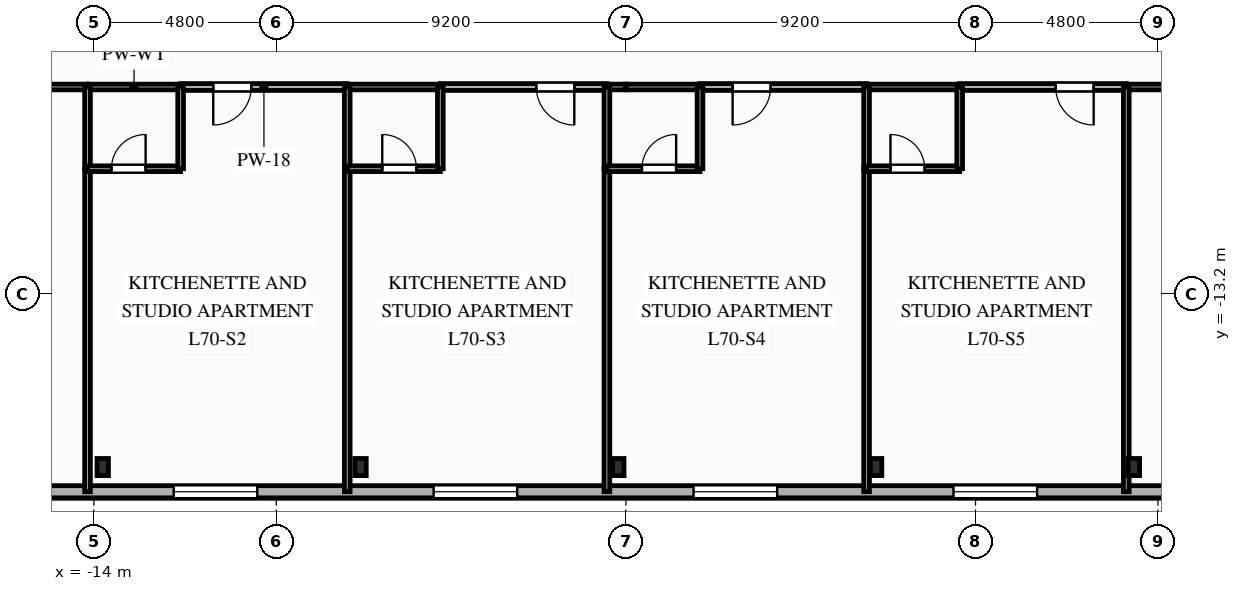
"""IFC4 building model, lengths in metres.
Left out: names, types, materials, properties, quantities, classifications, styles, units other than length and angle.
Written with IfcOpenShell. Run it as: python <this file> out.ifc"""

import sys

from ifc_helpers import new_model, si_unit, direction, frame, frame_2d, origin, origin_2d, place, context, subcontext, project, spatial, rectangle, i_section, extrude, element, fill, save


model = new_model("IFC4")
c1 = context("Model", 3, precision=1e-05, world=origin(), true_north=direction((0.0, 1.0)))
c2 = subcontext(c1, "Body", "Model", "MODEL_VIEW")
j1 = project(units=[si_unit("LENGTHUNIT", "METRE"), si_unit("PLANEANGLEUNIT", "RADIAN")], contexts=[c1])
p1 = place(None, origin())
s1 = spatial("IfcSite", under=j1, at=p1, CompositionType="ELEMENT")
p2 = place(p1, origin())
s2 = spatial("IfcBuilding", under=s1, at=p2, CompositionType="ELEMENT")
p3 = place(p2, frame((0.0, 0.0, 248.4)))
s3 = spatial("IfcBuildingStorey", under=s2, at=p3, CompositionType="ELEMENT", Elevation=248.4)
for number, where, z_axis, x_axis in (
    (1, (-13.767, -17.75, 0.0), (0.0, 0.0, 1.0), (1.0, 0.0, 0.0)),
    (2, (-6.983, -17.75, 0.0), (0.0, 0.0, 1.0), (1.0, 0.0, 0.0)),
    (3, (-0.2, -17.75, 0.0), (0.0, 0.0, 1.0), (1.0, 0.0, 0.0)),
    (4, (6.583, -17.75, 0.0), (0.0, 0.0, 1.0), (1.0, 0.0, 0.0)),
    (5, (13.367, -17.75, 0.0), (0.0, 0.0, 1.0), (1.0, 0.0, 0.0)),
):
    element("IfcColumn", number, at=place(p3, frame(where, z_axis=z_axis, x_axis=x_axis)), inside=s3, PredefinedType="COLUMN", context=c2, shape_type="SweptSolid", body=[
        extrude(i_section(OverallWidth=0.3, OverallDepth=0.45, WebThickness=0.014, FlangeThickness=0.026, FilletRadius=0.027, at=origin_2d()), origin(), (0.0, 0.0, 1.0), 3.35),
    ])
p4 = place(p3, frame((20.8, -18.4, 0.0), z_axis=(0.0, 0.0, 1.0), x_axis=(-1.0, 0.0, 0.0)))
e6 = element("IfcWall", 6, at=p4, inside=s3, PredefinedType="SOLIDWALL", context=c2, shape_type="SweptSolid", body=[
    extrude(rectangle(XDim=42.0, YDim=0.32, at=frame_2d((21.0, 0.0))), origin(), (0.0, 0.0, 1.0), 3.04),
])
p5 = place(p4, frame((3.255, 0.0, 0.85)))
e7 = element("IfcOpeningElement", 7, at=p5, cuts=e6, PredefinedType="OPENING", context=c2, shape_type="SweptSolid", body=[
    extrude(rectangle(XDim=1.65, YDim=1.85, at=frame_2d((0.825, 0.925))), frame((0.0, 0.17, 0.0), z_axis=(0.0, -1.0, 0.0), x_axis=(1.0, 0.0, 0.0)), (0.0, 0.0, 1.0), 0.34),
])
p6 = place(p4, frame((9.98, 0.0, 0.85)))
e8 = element("IfcOpeningElement", 8, at=p6, cuts=e6, PredefinedType="OPENING", context=c2, shape_type="SweptSolid", body=[
    extrude(rectangle(XDim=2.2, YDim=1.85, at=frame_2d((1.1, 0.925))), frame((0.0, 0.17, 0.0), z_axis=(0.0, -1.0, 0.0), x_axis=(1.0, 0.0, 0.0)), (0.0, 0.0, 1.0), 0.34),
])
p7 = place(p4, frame((16.82, 0.0, 0.85)))
e9 = element("IfcOpeningElement", 9, at=p7, cuts=e6, PredefinedType="OPENING", context=c2, shape_type="SweptSolid", body=[
    extrude(rectangle(XDim=2.2, YDim=1.85, at=frame_2d((1.1, 0.925))), frame((0.0, 0.17, 0.0), z_axis=(0.0, -1.0, 0.0), x_axis=(1.0, 0.0, 0.0)), (0.0, 0.0, 1.0), 0.34),
])
p8 = place(p4, frame((23.66, 0.0, 0.85)))
e10 = element("IfcOpeningElement", 10, at=p8, cuts=e6, PredefinedType="OPENING", context=c2, shape_type="SweptSolid", body=[
    extrude(rectangle(XDim=2.2, YDim=1.85, at=frame_2d((1.1, 0.925))), frame((0.0, 0.17, 0.0), z_axis=(0.0, -1.0, 0.0), x_axis=(1.0, 0.0, 0.0)), (0.0, 0.0, 1.0), 0.34),
])
p9 = place(p4, frame((30.5, 0.0, 0.85)))
e11 = element("IfcOpeningElement", 11, at=p9, cuts=e6, PredefinedType="OPENING", context=c2, shape_type="SweptSolid", body=[
    extrude(rectangle(XDim=2.2, YDim=1.85, at=frame_2d((1.1, 0.925))), frame((0.0, 0.17, 0.0), z_axis=(0.0, -1.0, 0.0), x_axis=(1.0, 0.0, 0.0)), (0.0, 0.0, 1.0), 0.34),
])
p10 = place(p4, frame((37.375, 0.0, 0.85)))
e12 = element("IfcOpeningElement", 12, at=p10, cuts=e6, PredefinedType="OPENING", context=c2, shape_type="SweptSolid", body=[
    extrude(rectangle(XDim=1.65, YDim=1.85, at=frame_2d((0.825, 0.925))), frame((0.0, 0.17, 0.0), z_axis=(0.0, -1.0, 0.0), x_axis=(1.0, 0.0, 0.0)), (0.0, 0.0, 1.0), 0.34),
])
p11 = place(p3, frame((-14.167, -7.75, 0.0), z_axis=(0.0, 0.0, 1.0), x_axis=(-1.0, 0.0, 0.0)))
e13 = element("IfcWall", 13, at=p11, inside=s3, PredefinedType="PARTITIONING", context=c2, shape_type="SweptSolid", body=[
    extrude(rectangle(XDim=6.333, YDim=0.15, at=frame_2d((3.167, 0.0))), origin(), (0.0, 0.0, 1.0), 3.04),
])
p12 = place(p11, frame((1.095, 0.0, 0.0)))
e14 = element("IfcOpeningElement", 14, at=p12, cuts=e13, PredefinedType="OPENING", context=c2, shape_type="SweptSolid", body=[
    extrude(rectangle(XDim=1.05, YDim=2.15, at=frame_2d((0.525, 1.075))), frame((0.0, 0.085, 0.0), z_axis=(0.0, -1.0, 0.0), x_axis=(1.0, 0.0, 0.0)), (0.0, 0.0, 1.0), 0.17),
])
p13 = place(p3, frame((-7.333, -7.75, 0.0), z_axis=(0.0, 0.0, 1.0), x_axis=(-1.0, 0.0, 0.0)))
e15 = element("IfcWall", 15, at=p13, inside=s3, PredefinedType="PARTITIONING", context=c2, shape_type="SweptSolid", body=[
    extrude(rectangle(XDim=4.384, YDim=0.18, at=frame_2d((2.192, 0.0))), origin(), (0.0, 0.0, 1.0), 3.04),
])
p14 = place(p13, frame((2.526, 0.0, 0.0)))
e16 = element("IfcOpeningElement", 16, at=p14, cuts=e15, PredefinedType="OPENING", context=c2, shape_type="SweptSolid", body=[
    extrude(rectangle(XDim=1.0, YDim=2.15, at=frame_2d((0.5, 1.075))), frame((0.0, 0.1, 0.0), z_axis=(0.0, -1.0, 0.0), x_axis=(1.0, 0.0, 0.0)), (0.0, 0.0, 1.0), 0.2),
])
p15 = place(p3, frame((-11.717, -7.75, 0.0), z_axis=(0.0, 0.0, 1.0), x_axis=(-1.0, 0.0, 0.0)))
e17 = element("IfcWall", 17, at=p15, inside=s3, PredefinedType="PLUMBINGWALL", context=c2, shape_type="SweptSolid", body=[
    extrude(rectangle(XDim=2.45, YDim=0.15, at=frame_2d((1.225, 0.0))), origin(), (0.0, 0.0, 1.0), 3.04),
])
p16 = place(p3, frame((-0.5, -7.75, 0.0), z_axis=(0.0, 0.0, 1.0), x_axis=(-1.0, 0.0, 0.0)))
e18 = element("IfcWall", 18, at=p16, inside=s3, PredefinedType="PARTITIONING", context=c2, shape_type="SweptSolid", body=[
    extrude(rectangle(XDim=4.383, YDim=0.18, at=frame_2d((2.191, 0.0))), origin(), (0.0, 0.0, 1.0), 3.04),
])
p17 = place(p16, frame((0.858, 0.0, 0.0)))
e19 = element("IfcOpeningElement", 19, at=p17, cuts=e18, PredefinedType="OPENING", context=c2, shape_type="SweptSolid", body=[
    extrude(rectangle(XDim=1.0, YDim=2.15, at=frame_2d((0.5, 1.075))), frame((0.0, 0.1, 0.0), z_axis=(0.0, -1.0, 0.0), x_axis=(1.0, 0.0, 0.0)), (0.0, 0.0, 1.0), 0.2),
])
p18 = place(p3, frame((-4.883, -7.75, 0.0), z_axis=(0.0, 0.0, 1.0), x_axis=(-1.0, 0.0, 0.0)))
e20 = element("IfcWall", 20, at=p18, inside=s3, PredefinedType="PLUMBINGWALL", context=c2, shape_type="SweptSolid", body=[
    extrude(rectangle(XDim=2.45, YDim=0.15, at=frame_2d((1.225, 0.0))), origin(), (0.0, 0.0, 1.0), 3.04),
])
p19 = place(p3, frame((0.0, -7.75, 0.0), z_axis=(0.0, 0.0, 1.0), x_axis=(-1.0, 0.0, 0.0)))
e21 = element("IfcWall", 21, at=p19, inside=s3, PredefinedType="PLUMBINGWALL", context=c2, shape_type="SweptSolid", body=[
    extrude(rectangle(XDim=0.5, YDim=0.15, at=frame_2d((0.25, 0.0))), origin(), (0.0, 0.0, 1.0), 3.04),
])
p20 = place(p3, frame((6.333, -7.75, 0.0), z_axis=(0.0, 0.0, 1.0), x_axis=(-1.0, 0.0, 0.0)))
e22 = element("IfcWall", 22, at=p20, inside=s3, PredefinedType="PARTITIONING", context=c2, shape_type="SweptSolid", body=[
    extrude(rectangle(XDim=4.383, YDim=0.18, at=frame_2d((2.191, 0.0))), origin(), (0.0, 0.0, 1.0), 3.04),
])
p21 = place(p20, frame((2.525, 0.0, 0.0)))
e23 = element("IfcOpeningElement", 23, at=p21, cuts=e22, PredefinedType="OPENING", context=c2, shape_type="SweptSolid", body=[
    extrude(rectangle(XDim=1.0, YDim=2.15, at=frame_2d((0.5, 1.075))), frame((0.0, 0.1, 0.0), z_axis=(0.0, -1.0, 0.0), x_axis=(1.0, 0.0, 0.0)), (0.0, 0.0, 1.0), 0.2),
])
p22 = place(p3, frame((1.95, -7.75, 0.0), z_axis=(0.0, 0.0, 1.0), x_axis=(-1.0, 0.0, 0.0)))
e24 = element("IfcWall", 24, at=p22, inside=s3, PredefinedType="PLUMBINGWALL", context=c2, shape_type="SweptSolid", body=[
    extrude(rectangle(XDim=1.95, YDim=0.15, at=frame_2d((0.975, 0.0))), origin(), (0.0, 0.0, 1.0), 3.04),
])
p23 = place(p3, frame((13.167, -7.75, 0.0), z_axis=(0.0, 0.0, 1.0), x_axis=(-1.0, 0.0, 0.0)))
e25 = element("IfcWall", 25, at=p23, inside=s3, PredefinedType="PARTITIONING", context=c2, shape_type="SweptSolid", body=[
    extrude(rectangle(XDim=4.384, YDim=0.18, at=frame_2d((2.192, 0.0))), origin(), (0.0, 0.0, 1.0), 3.04),
])
p24 = place(p23, frame((0.858, 0.0, 0.0)))
e26 = element("IfcOpeningElement", 26, at=p24, cuts=e25, PredefinedType="OPENING", context=c2, shape_type="SweptSolid", body=[
    extrude(rectangle(XDim=1.0, YDim=2.15, at=frame_2d((0.5, 1.075))), frame((0.0, 0.1, 0.0), z_axis=(0.0, -1.0, 0.0), x_axis=(1.0, 0.0, 0.0)), (0.0, 0.0, 1.0), 0.2),
])
p25 = place(p3, frame((8.783, -7.75, 0.0), z_axis=(0.0, 0.0, 1.0), x_axis=(-1.0, 0.0, 0.0)))
e27 = element("IfcWall", 27, at=p25, inside=s3, PredefinedType="PLUMBINGWALL", context=c2, shape_type="SweptSolid", body=[
    extrude(rectangle(XDim=2.45, YDim=0.15, at=frame_2d((1.225, 0.0))), origin(), (0.0, 0.0, 1.0), 3.04),
])
p26 = place(p3, frame((20.5, -7.75, 0.0), z_axis=(0.0, 0.0, 1.0), x_axis=(-1.0, 0.0, 0.0)))
e28 = element("IfcWall", 28, at=p26, inside=s3, PredefinedType="PARTITIONING", context=c2, shape_type="SweptSolid", body=[
    extrude(rectangle(XDim=7.333, YDim=0.15, at=frame_2d((3.667, 0.0))), origin(), (0.0, 0.0, 1.0), 3.04),
])
p27 = place(p26, frame((5.062, 0.0, 0.0)))
e29 = element("IfcOpeningElement", 29, at=p27, cuts=e28, PredefinedType="OPENING", context=c2, shape_type="SweptSolid", body=[
    extrude(rectangle(XDim=1.05, YDim=2.15, at=frame_2d((0.525, 1.075))), frame((0.0, 0.085, 0.0), z_axis=(0.0, -1.0, 0.0), x_axis=(1.0, 0.0, 0.0)), (0.0, 0.0, 1.0), 0.17),
])
p28 = place(p3, frame((-14.167, -9.9, 0.0), z_axis=(0.0, 0.0, 1.0), x_axis=(0.0, -1.0, 0.0)))
e30 = element("IfcWall", 30, at=p28, inside=s3, PredefinedType="PARTITIONING", context=c2, shape_type="SweptSolid", body=[
    extrude(rectangle(XDim=8.5, YDim=0.15, at=frame_2d((4.25, 0.0))), origin(), (0.0, 0.0, 1.0), 3.04),
])
p29 = place(p3, frame((-14.167, -7.75, 0.0), z_axis=(0.0, 0.0, 1.0), x_axis=(0.0, -1.0, 0.0)))
e31 = element("IfcWall", 31, at=p29, inside=s3, PredefinedType="PLUMBINGWALL", context=c2, shape_type="SweptSolid", body=[
    extrude(rectangle(XDim=2.15, YDim=0.15, at=frame_2d((1.075, 0.0))), origin(), (0.0, 0.0, 1.0), 3.04),
])
p30 = place(p3, frame((-14.167, -9.9, 0.0), z_axis=(0.0, 0.0, 1.0), x_axis=(1.0, 0.0, 0.0)))
e32 = element("IfcWall", 32, at=p30, inside=s3, PredefinedType="PLUMBINGWALL", context=c2, shape_type="SweptSolid", body=[
    extrude(rectangle(XDim=2.45, YDim=0.15, at=frame_2d((1.225, 0.0))), origin(), (0.0, 0.0, 1.0), 3.04),
])
p31 = place(p30, frame((0.629, 0.0, 0.0)))
e33 = element("IfcOpeningElement", 33, at=p31, cuts=e32, PredefinedType="OPENING", context=c2, shape_type="SweptSolid", body=[
    extrude(rectangle(XDim=0.9, YDim=2.1, at=frame_2d((0.45, 1.05))), frame((0.0, 0.085, 0.0), z_axis=(0.0, -1.0, 0.0), x_axis=(1.0, 0.0, 0.0)), (0.0, 0.0, 1.0), 0.17),
])
p32 = place(p3, frame((-11.717, -9.9, 0.0), z_axis=(0.0, 0.0, 1.0), x_axis=(0.0, 1.0, 0.0)))
e34 = element("IfcWall", 34, at=p32, inside=s3, PredefinedType="PLUMBINGWALL", context=c2, shape_type="SweptSolid", body=[
    extrude(rectangle(XDim=2.15, YDim=0.15, at=frame_2d((1.075, 0.0))), origin(), (0.0, 0.0, 1.0), 3.04),
])
p33 = place(p3, frame((-7.333, -9.9, 0.0), z_axis=(0.0, 0.0, 1.0), x_axis=(0.0, -1.0, 0.0)))
e35 = element("IfcWall", 35, at=p33, inside=s3, PredefinedType="PARTITIONING", context=c2, shape_type="SweptSolid", body=[
    extrude(rectangle(XDim=8.5, YDim=0.15, at=frame_2d((4.25, 0.0))), origin(), (0.0, 0.0, 1.0), 2.665),
])
p34 = place(p3, frame((-7.333, -7.75, 0.0), z_axis=(0.0, 0.0, 1.0), x_axis=(0.0, -1.0, 0.0)))
e36 = element("IfcWall", 36, at=p34, inside=s3, PredefinedType="PLUMBINGWALL", context=c2, shape_type="SweptSolid", body=[
    extrude(rectangle(XDim=2.15, YDim=0.15, at=frame_2d((1.075, 0.0))), origin(), (0.0, 0.0, 1.0), 3.04),
])
p35 = place(p3, frame((-7.333, -9.9, 0.0), z_axis=(0.0, 0.0, 1.0), x_axis=(1.0, 0.0, 0.0)))
e37 = element("IfcWall", 37, at=p35, inside=s3, PredefinedType="PLUMBINGWALL", context=c2, shape_type="SweptSolid", body=[
    extrude(rectangle(XDim=2.45, YDim=0.15, at=frame_2d((1.225, 0.0))), origin(), (0.0, 0.0, 1.0), 3.04),
])
p36 = place(p35, frame((0.921, 0.0, 0.0)))
e38 = element("IfcOpeningElement", 38, at=p36, cuts=e37, PredefinedType="OPENING", context=c2, shape_type="SweptSolid", body=[
    extrude(rectangle(XDim=0.9, YDim=2.1, at=frame_2d((0.45, 1.05))), frame((0.0, 0.085, 0.0), z_axis=(0.0, -1.0, 0.0), x_axis=(1.0, 0.0, 0.0)), (0.0, 0.0, 1.0), 0.17),
])
p37 = place(p3, frame((-4.883, -9.9, 0.0), z_axis=(0.0, 0.0, 1.0), x_axis=(0.0, 1.0, 0.0)))
e39 = element("IfcWall", 39, at=p37, inside=s3, PredefinedType="PLUMBINGWALL", context=c2, shape_type="SweptSolid", body=[
    extrude(rectangle(XDim=2.15, YDim=0.15, at=frame_2d((1.075, 0.0))), origin(), (0.0, 0.0, 1.0), 3.04),
])
p38 = place(p3, frame((-0.5, -9.9, 0.0), z_axis=(0.0, 0.0, 1.0), x_axis=(0.0, -1.0, 0.0)))
e40 = element("IfcWall", 40, at=p38, inside=s3, PredefinedType="PARTITIONING", context=c2, shape_type="SweptSolid", body=[
    extrude(rectangle(XDim=8.5, YDim=0.15, at=frame_2d((4.25, 0.0))), origin(), (0.0, 0.0, 1.0), 3.04),
])
p39 = place(p3, frame((-0.5, -7.75, 0.0), z_axis=(0.0, 0.0, 1.0), x_axis=(0.0, -1.0, 0.0)))
e41 = element("IfcWall", 41, at=p39, inside=s3, PredefinedType="PLUMBINGWALL", context=c2, shape_type="SweptSolid", body=[
    extrude(rectangle(XDim=2.15, YDim=0.15, at=frame_2d((1.075, 0.0))), origin(), (0.0, 0.0, 1.0), 3.04),
])
p40 = place(p3, frame((-0.5, -9.9, 0.0), z_axis=(0.0, 0.0, 1.0), x_axis=(1.0, 0.0, 0.0)))
e42 = element("IfcWall", 42, at=p40, inside=s3, PredefinedType="PLUMBINGWALL", context=c2, shape_type="SweptSolid", body=[
    extrude(rectangle(XDim=2.45, YDim=0.15, at=frame_2d((1.225, 0.0))), origin(), (0.0, 0.0, 1.0), 3.04),
])
p41 = place(p40, frame((0.921, 0.0, 0.0)))
e43 = element("IfcOpeningElement", 43, at=p41, cuts=e42, PredefinedType="OPENING", context=c2, shape_type="SweptSolid", body=[
    extrude(rectangle(XDim=0.9, YDim=2.1, at=frame_2d((0.45, 1.05))), frame((0.0, 0.085, 0.0), z_axis=(0.0, -1.0, 0.0), x_axis=(1.0, 0.0, 0.0)), (0.0, 0.0, 1.0), 0.17),
])
p42 = place(p3, frame((1.95, -9.9, 0.0), z_axis=(0.0, 0.0, 1.0), x_axis=(0.0, 1.0, 0.0)))
e44 = element("IfcWall", 44, at=p42, inside=s3, PredefinedType="PLUMBINGWALL", context=c2, shape_type="SweptSolid", body=[
    extrude(rectangle(XDim=2.15, YDim=0.15, at=frame_2d((1.075, 0.0))), origin(), (0.0, 0.0, 1.0), 3.04),
])
p43 = place(p3, frame((6.333, -9.9, 0.0), z_axis=(0.0, 0.0, 1.0), x_axis=(0.0, -1.0, 0.0)))
e45 = element("IfcWall", 45, at=p43, inside=s3, PredefinedType="PARTITIONING", context=c2, shape_type="SweptSolid", body=[
    extrude(rectangle(XDim=8.5, YDim=0.15, at=frame_2d((4.25, 0.0))), origin(), (0.0, 0.0, 1.0), 3.04),
])
p44 = place(p3, frame((6.333, -7.75, 0.0), z_axis=(0.0, 0.0, 1.0), x_axis=(0.0, -1.0, 0.0)))
e46 = element("IfcWall", 46, at=p44, inside=s3, PredefinedType="PLUMBINGWALL", context=c2, shape_type="SweptSolid", body=[
    extrude(rectangle(XDim=2.15, YDim=0.15, at=frame_2d((1.075, 0.0))), origin(), (0.0, 0.0, 1.0), 3.04),
])
p45 = place(p3, frame((6.333, -9.9, 0.0), z_axis=(0.0, 0.0, 1.0), x_axis=(1.0, 0.0, 0.0)))
e47 = element("IfcWall", 47, at=p45, inside=s3, PredefinedType="PLUMBINGWALL", context=c2, shape_type="SweptSolid", body=[
    extrude(rectangle(XDim=2.45, YDim=0.15, at=frame_2d((1.225, 0.0))), origin(), (0.0, 0.0, 1.0), 3.04),
])
p46 = place(p45, frame((0.629, 0.0, 0.0)))
e48 = element("IfcOpeningElement", 48, at=p46, cuts=e47, PredefinedType="OPENING", context=c2, shape_type="SweptSolid", body=[
    extrude(rectangle(XDim=0.9, YDim=2.1, at=frame_2d((0.45, 1.05))), frame((0.0, 0.085, 0.0), z_axis=(0.0, -1.0, 0.0), x_axis=(1.0, 0.0, 0.0)), (0.0, 0.0, 1.0), 0.17),
])
p47 = place(p3, frame((8.783, -9.9, 0.0), z_axis=(0.0, 0.0, 1.0), x_axis=(0.0, 1.0, 0.0)))
e49 = element("IfcWall", 49, at=p47, inside=s3, PredefinedType="PLUMBINGWALL", context=c2, shape_type="SweptSolid", body=[
    extrude(rectangle(XDim=2.15, YDim=0.15, at=frame_2d((1.075, 0.0))), origin(), (0.0, 0.0, 1.0), 2.665),
])
p48 = place(p3, frame((13.167, -7.75, 0.0), z_axis=(0.0, 0.0, 1.0), x_axis=(0.0, -1.0, 0.0)))
e50 = element("IfcWall", 50, at=p48, inside=s3, PredefinedType="PARTITIONING", context=c2, shape_type="SweptSolid", body=[
    extrude(rectangle(XDim=10.65, YDim=0.15, at=frame_2d((5.325, 0.0))), origin(), (0.0, 0.0, 1.0), 3.04),
])
p49 = place(p6, origin())
e51 = element("IfcWindow", 51, at=p49, inside=s3, PartitioningType="SINGLE_PANEL", PredefinedType="WINDOW", context=c2, shape_type="SweptSolid", body=[
    extrude(rectangle(XDim=2.2, YDim=1.85, at=frame_2d((1.1, 0.925))), frame((0.0, 0.03, 0.0), z_axis=(0.0, -1.0, 0.0), x_axis=(1.0, 0.0, 0.0)), (0.0, 0.0, 1.0), 0.06),
])
fill(e8, e51)
p50 = place(p7, origin())
e52 = element("IfcWindow", 52, at=p50, inside=s3, PartitioningType="SINGLE_PANEL", PredefinedType="WINDOW", context=c2, shape_type="SweptSolid", body=[
    extrude(rectangle(XDim=2.2, YDim=1.85, at=frame_2d((1.1, 0.925))), frame((0.0, 0.03, 0.0), z_axis=(0.0, -1.0, 0.0), x_axis=(1.0, 0.0, 0.0)), (0.0, 0.0, 1.0), 0.06),
])
fill(e9, e52)
p51 = place(p8, origin())
e53 = element("IfcWindow", 53, at=p51, inside=s3, PartitioningType="SINGLE_PANEL", PredefinedType="WINDOW", context=c2, shape_type="SweptSolid", body=[
    extrude(rectangle(XDim=2.2, YDim=1.85, at=frame_2d((1.1, 0.925))), frame((0.0, 0.03, 0.0), z_axis=(0.0, -1.0, 0.0), x_axis=(1.0, 0.0, 0.0)), (0.0, 0.0, 1.0), 0.06),
])
fill(e10, e53)
p52 = place(p9, origin())
e54 = element("IfcWindow", 54, at=p52, inside=s3, PartitioningType="SINGLE_PANEL", PredefinedType="WINDOW", context=c2, shape_type="SweptSolid", body=[
    extrude(rectangle(XDim=2.2, YDim=1.85, at=frame_2d((1.1, 0.925))), frame((0.0, 0.03, 0.0), z_axis=(0.0, -1.0, 0.0), x_axis=(1.0, 0.0, 0.0)), (0.0, 0.0, 1.0), 0.06),
])
fill(e11, e54)
p53 = place(p14, origin())
e55 = element("IfcDoor", 55, at=p53, inside=s3, OperationType="SINGLE_SWING_RIGHT", PredefinedType="DOOR", context=c2, shape_type="SweptSolid", body=[
    extrude(rectangle(XDim=1.0, YDim=2.15, at=frame_2d((0.5, 1.075))), frame((0.0, 0.025, 0.0), z_axis=(0.0, -1.0, 0.0), x_axis=(1.0, 0.0, 0.0)), (0.0, 0.0, 1.0), 0.05),
])
fill(e16, e55)
p54 = place(p17, origin())
e56 = element("IfcDoor", 56, at=p54, inside=s3, OperationType="SINGLE_SWING_LEFT", PredefinedType="DOOR", context=c2, shape_type="SweptSolid", body=[
    extrude(rectangle(XDim=1.0, YDim=2.15, at=frame_2d((0.5, 1.075))), frame((0.0, 0.025, 0.0), z_axis=(0.0, -1.0, 0.0), x_axis=(1.0, 0.0, 0.0)), (0.0, 0.0, 1.0), 0.05),
])
fill(e19, e56)
p55 = place(p21, origin())
e57 = element("IfcDoor", 57, at=p55, inside=s3, OperationType="SINGLE_SWING_RIGHT", PredefinedType="DOOR", context=c2, shape_type="SweptSolid", body=[
    extrude(rectangle(XDim=1.0, YDim=2.15, at=frame_2d((0.5, 1.075))), frame((0.0, 0.025, 0.0), z_axis=(0.0, -1.0, 0.0), x_axis=(1.0, 0.0, 0.0)), (0.0, 0.0, 1.0), 0.05),
])
fill(e23, e57)
p56 = place(p24, origin())
e58 = element("IfcDoor", 58, at=p56, inside=s3, OperationType="SINGLE_SWING_LEFT", PredefinedType="DOOR", context=c2, shape_type="SweptSolid", body=[
    extrude(rectangle(XDim=1.0, YDim=2.15, at=frame_2d((0.5, 1.075))), frame((0.0, 0.025, 0.0), z_axis=(0.0, -1.0, 0.0), x_axis=(1.0, 0.0, 0.0)), (0.0, 0.0, 1.0), 0.05),
])
fill(e26, e58)
p57 = place(p31, origin())
e59 = element("IfcDoor", 59, at=p57, inside=s3, OperationType="SINGLE_SWING_RIGHT", PredefinedType="DOOR", context=c2, shape_type="SweptSolid", body=[
    extrude(rectangle(XDim=0.9, YDim=2.1, at=frame_2d((0.45, 1.05))), frame((0.0, 0.025, 0.0), z_axis=(0.0, -1.0, 0.0), x_axis=(1.0, 0.0, 0.0)), (0.0, 0.0, 1.0), 0.05),
])
fill(e33, e59)
p58 = place(p36, origin())
e60 = element("IfcDoor", 60, at=p58, inside=s3, OperationType="SINGLE_SWING_LEFT", PredefinedType="DOOR", context=c2, shape_type="SweptSolid", body=[
    extrude(rectangle(XDim=0.9, YDim=2.1, at=frame_2d((0.45, 1.05))), frame((0.0, 0.025, 0.0), z_axis=(0.0, -1.0, 0.0), x_axis=(1.0, 0.0, 0.0)), (0.0, 0.0, 1.0), 0.05),
])
fill(e38, e60)
p59 = place(p41, origin())
e61 = element("IfcDoor", 61, at=p59, inside=s3, OperationType="SINGLE_SWING_RIGHT", PredefinedType="DOOR", context=c2, shape_type="SweptSolid", body=[
    extrude(rectangle(XDim=0.9, YDim=2.1, at=frame_2d((0.45, 1.05))), frame((0.0, 0.025, 0.0), z_axis=(0.0, -1.0, 0.0), x_axis=(1.0, 0.0, 0.0)), (0.0, 0.0, 1.0), 0.05),
])
fill(e43, e61)
p60 = place(p46, origin())
e62 = element("IfcDoor", 62, at=p60, inside=s3, OperationType="SINGLE_SWING_LEFT", PredefinedType="DOOR", context=c2, shape_type="SweptSolid", body=[
    extrude(rectangle(XDim=0.9, YDim=2.1, at=frame_2d((0.45, 1.05))), frame((0.0, 0.025, 0.0), z_axis=(0.0, -1.0, 0.0), x_axis=(1.0, 0.0, 0.0)), (0.0, 0.0, 1.0), 0.05),
])
fill(e48, e62)
save(model, sys.argv[1])
